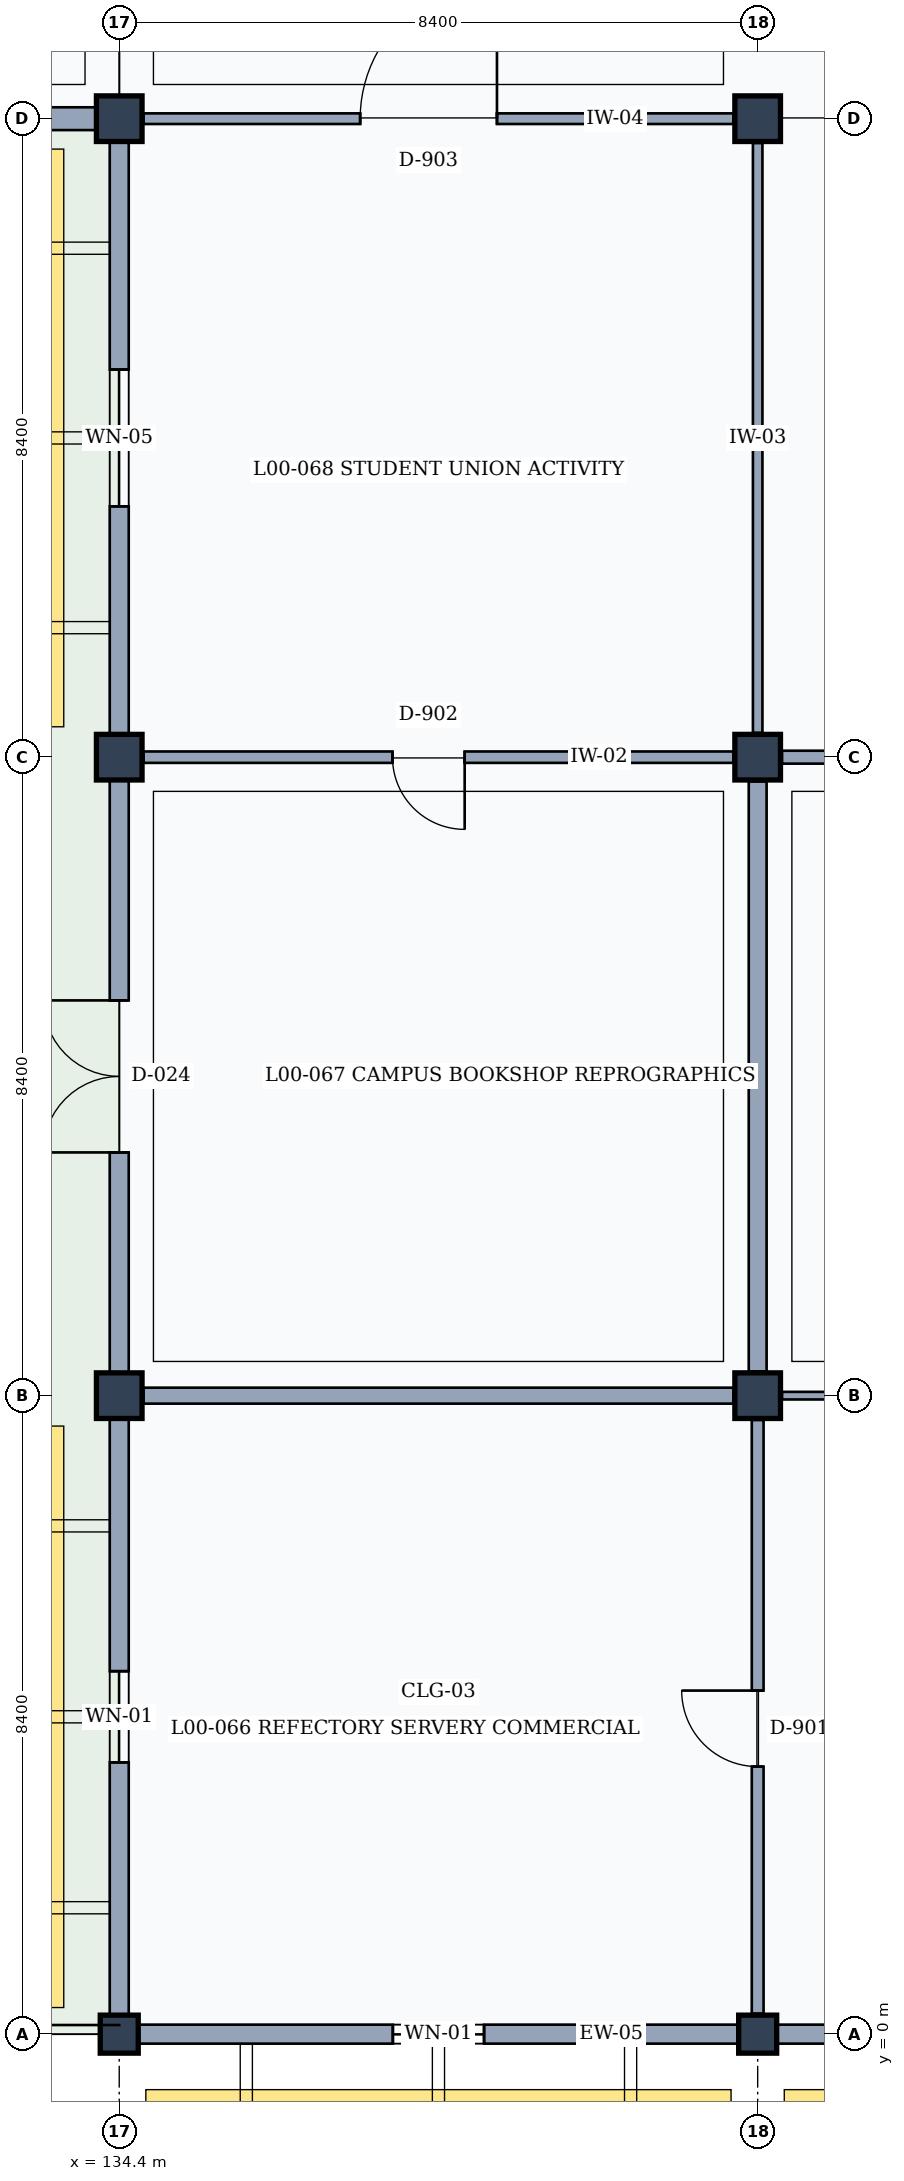
"""IFC4 building model, lengths in metres.
Left out: names, types, materials, properties, quantities, classifications, styles, units other than length and angle.
Written with IfcOpenShell. Run it as: python <this file> out.ifc"""

import sys

from ifc_helpers import new_model, si_unit, direction, frame, frame_2d, origin, origin_2d, place, context, subcontext, project, spatial, rectangle, extrude, element, fill, save


model = new_model("IFC4")
c1 = context("Model", 3, precision=1e-05, world=origin(), true_north=direction((0.0, 1.0)))
c2 = subcontext(c1, "Body", "Model", "MODEL_VIEW")
j1 = project(units=[si_unit("LENGTHUNIT", "METRE"), si_unit("PLANEANGLEUNIT", "RADIAN")], contexts=[c1])
p1 = place(None, origin())
s1 = spatial("IfcSite", under=j1, at=p1, CompositionType="ELEMENT")
p2 = place(p1, origin())
s2 = spatial("IfcBuilding", under=s1, at=p2, CompositionType="ELEMENT")
p3 = place(p2, origin())
s3 = spatial("IfcBuildingStorey", under=s2, at=p3, CompositionType="ELEMENT", Elevation=0.0)
p4 = place(p3, frame((134.4, 0.0, 0.0), z_axis=(0.0, 0.0, 1.0), x_axis=(1.0, 0.0, 0.0)))
e1 = element("IfcColumn", 1, at=p4, inside=s3, PredefinedType="COLUMN", context=c2, shape_type="SweptSolid", body=[
    extrude(rectangle(XDim=0.5, YDim=0.5, at=origin_2d()), origin(), (0.0, 0.0, 1.0), 4.8),
])
for number, where, z_axis, x_axis in (
    (2, (134.4, 8.4, 0.0), (0.0, 0.0, 1.0), (1.0, 0.0, 0.0)),
    (3, (134.4, 16.8, 0.0), (0.0, 0.0, 1.0), (1.0, 0.0, 0.0)),
    (4, (134.4, 25.2, 0.0), (0.0, 0.0, 1.0), (1.0, 0.0, 0.0)),
):
    element("IfcColumn", number, at=place(p3, frame(where, z_axis=z_axis, x_axis=x_axis)), inside=s3, PredefinedType="COLUMN", context=c2, shape_type="SweptSolid", body=[
        extrude(rectangle(XDim=0.6, YDim=0.6, at=origin_2d()), origin(), (0.0, 0.0, 1.0), 4.8),
    ])
p5 = place(p3, frame((142.8, 0.0, 0.0), z_axis=(0.0, 0.0, 1.0), x_axis=(1.0, 0.0, 0.0)))
e5 = element("IfcColumn", 5, at=p5, inside=s3, PredefinedType="COLUMN", context=c2, shape_type="SweptSolid", body=[
    extrude(rectangle(XDim=0.5, YDim=0.5, at=origin_2d()), origin(), (0.0, 0.0, 1.0), 4.8),
])
for number, where, z_axis, x_axis in (
    (6, (142.8, 8.4, 0.0), (0.0, 0.0, 1.0), (1.0, 0.0, 0.0)),
    (7, (142.8, 16.8, 0.0), (0.0, 0.0, 1.0), (1.0, 0.0, 0.0)),
    (8, (142.8, 25.2, 0.0), (0.0, 0.0, 1.0), (1.0, 0.0, 0.0)),
):
    element("IfcColumn", number, at=place(p3, frame(where, z_axis=z_axis, x_axis=x_axis)), inside=s3, PredefinedType="COLUMN", context=c2, shape_type="SweptSolid", body=[
        extrude(rectangle(XDim=0.6, YDim=0.6, at=origin_2d()), origin(), (0.0, 0.0, 1.0), 4.8),
    ])
p6 = place(p3, frame((134.1, 25.2, 0.0), z_axis=(0.0, 0.0, 1.0), x_axis=(-1.0, 0.0, 0.0)))
e9 = element("IfcWall", 9, at=p6, inside=s3, PredefinedType="SOLIDWALL", context=c2, shape_type="SweptSolid", body=[
    extrude(rectangle(XDim=7.8, YDim=0.3, at=frame_2d((3.9, 0.0))), origin(), (0.0, 0.0, 1.0), 3.87),
])
p7 = place(p6, frame((3.0, 0.0, 0.0)))
e10 = element("IfcOpeningElement", 10, at=p7, cuts=e9, PredefinedType="OPENING", context=c2, shape_type="SweptSolid", body=[
    extrude(rectangle(XDim=1.8, YDim=2.2, at=frame_2d((0.9, 1.1))), frame((0.0, 0.16, 0.0), z_axis=(0.0, -1.0, 0.0), x_axis=(1.0, 0.0, 0.0)), (0.0, 0.0, 1.0), 0.32),
])
p8 = place(p3, frame((142.55, 0.0, 0.0), z_axis=(0.0, 0.0, 1.0), x_axis=(-1.0, 0.0, 0.0)))
e11 = element("IfcWall", 11, at=p8, inside=s3, PredefinedType="SOLIDWALL", context=c2, shape_type="SweptSolid", body=[
    extrude(rectangle(XDim=7.9, YDim=0.25, at=frame_2d((3.95, 0.0))), origin(), (0.0, 0.0, 1.0), 3.96),
])
p9 = place(p8, frame((3.35, 0.0, 0.95)))
e12 = element("IfcOpeningElement", 12, at=p9, cuts=e11, PredefinedType="OPENING", context=c2, shape_type="SweptSolid", body=[
    extrude(rectangle(XDim=1.2, YDim=1.8, at=frame_2d((0.6, 0.9))), frame((0.0, 0.135, 0.0), z_axis=(0.0, -1.0, 0.0), x_axis=(1.0, 0.0, 0.0)), (0.0, 0.0, 1.0), 0.27),
])
p10 = place(p3, frame((134.4, 0.25, 0.0), z_axis=(0.0, 0.0, 1.0), x_axis=(0.0, 1.0, 0.0)))
e13 = element("IfcWall", 13, at=p10, inside=s3, PredefinedType="SOLIDWALL", context=c2, shape_type="SweptSolid", body=[
    extrude(rectangle(XDim=7.85, YDim=0.25, at=frame_2d((3.925, 0.0))), origin(), (0.0, 0.0, 1.0), 3.96),
])
p11 = place(p10, frame((3.325, 0.0, 0.95)))
e14 = element("IfcOpeningElement", 14, at=p11, cuts=e13, PredefinedType="OPENING", context=c2, shape_type="SweptSolid", body=[
    extrude(rectangle(XDim=1.2, YDim=1.8, at=frame_2d((0.6, 0.9))), frame((0.0, 0.135, 0.0), z_axis=(0.0, -1.0, 0.0), x_axis=(1.0, 0.0, 0.0)), (0.0, 0.0, 1.0), 0.27),
])
p12 = place(p3, frame((134.4, 8.7, 0.0), z_axis=(0.0, 0.0, 1.0), x_axis=(0.0, 1.0, 0.0)))
e15 = element("IfcWall", 15, at=p12, inside=s3, PredefinedType="SOLIDWALL", context=c2, shape_type="SweptSolid", body=[
    extrude(rectangle(XDim=7.8, YDim=0.25, at=frame_2d((3.9, 0.0))), origin(), (0.0, 0.0, 1.0), 3.96),
])
p13 = place(p12, frame((2.9, 0.0, 0.0)))
e16 = element("IfcOpeningElement", 16, at=p13, cuts=e15, PredefinedType="OPENING", context=c2, shape_type="SweptSolid", body=[
    extrude(rectangle(XDim=2.0, YDim=2.3, at=frame_2d((1.0, 1.15))), frame((0.0, 0.135, 0.0), z_axis=(0.0, -1.0, 0.0), x_axis=(1.0, 0.0, 0.0)), (0.0, 0.0, 1.0), 0.27),
])
p14 = place(p3, frame((134.4, 17.1, 0.0), z_axis=(0.0, 0.0, 1.0), x_axis=(0.0, 1.0, 0.0)))
e17 = element("IfcWall", 17, at=p14, inside=s3, PredefinedType="SOLIDWALL", context=c2, shape_type="SweptSolid", body=[
    extrude(rectangle(XDim=7.8, YDim=0.25, at=frame_2d((3.9, 0.0))), origin(), (0.0, 0.0, 1.0), 3.96),
])
p15 = place(p14, frame((3.0, 0.0, 0.95)))
e18 = element("IfcOpeningElement", 18, at=p15, cuts=e17, PredefinedType="OPENING", context=c2, shape_type="SweptSolid", body=[
    extrude(rectangle(XDim=1.8, YDim=1.5, at=frame_2d((0.9, 0.75))), frame((0.0, 0.135, 0.0), z_axis=(0.0, -1.0, 0.0), x_axis=(1.0, 0.0, 0.0)), (0.0, 0.0, 1.0), 0.27),
])
p16 = place(p3, frame((150.9, 0.0, 0.0), z_axis=(0.0, 0.0, 1.0), x_axis=(-1.0, 0.0, 0.0)))
e19 = element("IfcWall", 19, at=p16, inside=s3, PredefinedType="SOLIDWALL", context=c2, shape_type="SweptSolid", body=[
    extrude(rectangle(XDim=7.85, YDim=0.25, at=frame_2d((3.925, 0.0))), origin(), (0.0, 0.0, 1.0), 3.96),
])
p17 = place(p16, frame((3.125, 0.0, 0.95)))
e20 = element("IfcOpeningElement", 20, at=p17, cuts=e19, PredefinedType="OPENING", context=c2, shape_type="SweptSolid", body=[
    extrude(rectangle(XDim=1.6, YDim=2.0, at=frame_2d((0.8, 1.0))), frame((0.0, 0.135, 0.0), z_axis=(0.0, -1.0, 0.0), x_axis=(1.0, 0.0, 0.0)), (0.0, 0.0, 1.0), 0.27),
])
p18 = place(p3, frame((142.8, 0.27, 0.0), z_axis=(0.0, 0.0, 1.0), x_axis=(0.0, 1.0, 0.0)))
e21 = element("IfcWall", 21, at=p18, inside=s3, PredefinedType="PARTITIONING", context=c2, shape_type="SweptSolid", body=[
    extrude(rectangle(XDim=7.81, YDim=0.155, at=frame_2d((3.905, 0.0))), origin(), (0.0, 0.0, 1.0), 3.92),
])
p19 = place(p18, frame((3.25, 0.0, 0.0)))
e22 = element("IfcOpeningElement", 22, at=p19, cuts=e21, PredefinedType="OPENING", context=c2, shape_type="SweptSolid", body=[
    extrude(rectangle(XDim=1.0, YDim=2.15, at=frame_2d((0.5, 1.075))), frame((0.0, 0.087, 0.0), z_axis=(0.0, -1.0, 0.0), x_axis=(1.0, 0.0, 0.0)), (0.0, 0.0, 1.0), 0.175),
])
p20 = place(p3, frame((134.72, 8.4, 0.0), z_axis=(0.0, 0.0, 1.0), x_axis=(1.0, 0.0, 0.0)))
e23 = element("IfcWall", 23, at=p20, inside=s3, PredefinedType="PARTITIONING", context=c2, shape_type="SweptSolid", body=[
    extrude(rectangle(XDim=7.76, YDim=0.21, at=frame_2d((3.88, 0.0))), origin(), (0.0, 0.0, 1.0), 3.87),
])
p21 = place(p3, frame((142.8, 8.72, 0.0), z_axis=(0.0, 0.0, 1.0), x_axis=(0.0, 1.0, 0.0)))
e24 = element("IfcWall", 24, at=p21, inside=s3, PredefinedType="PARTITIONING", context=c2, shape_type="SweptSolid", body=[
    extrude(rectangle(XDim=7.76, YDim=0.235, at=frame_2d((3.88, 0.0))), origin(), (0.0, 0.0, 1.0), 3.92),
])
p22 = place(p3, frame((134.72, 16.8, 0.0), z_axis=(0.0, 0.0, 1.0), x_axis=(1.0, 0.0, 0.0)))
e25 = element("IfcWall", 25, at=p22, inside=s3, PredefinedType="PARTITIONING", context=c2, shape_type="SweptSolid", body=[
    extrude(rectangle(XDim=7.76, YDim=0.15, at=frame_2d((3.88, 0.0))), origin(), (0.0, 0.0, 1.0), 3.87),
])
p23 = place(p22, frame((3.275, 0.0, 0.0)))
e26 = element("IfcOpeningElement", 26, at=p23, cuts=e25, PredefinedType="OPENING", context=c2, shape_type="SweptSolid", body=[
    extrude(rectangle(XDim=0.95, YDim=2.15, at=frame_2d((0.475, 1.075))), frame((0.0, 0.085, 0.0), z_axis=(0.0, -1.0, 0.0), x_axis=(1.0, 0.0, 0.0)), (0.0, 0.0, 1.0), 0.17),
])
p24 = place(p3, frame((142.8, 17.12, 0.0), z_axis=(0.0, 0.0, 1.0), x_axis=(0.0, 1.0, 0.0)))
e27 = element("IfcWall", 27, at=p24, inside=s3, PredefinedType="PARTITIONING", context=c2, shape_type="SweptSolid", body=[
    extrude(rectangle(XDim=7.76, YDim=0.125, at=frame_2d((3.88, 0.0))), origin(), (0.0, 0.0, 1.0), 3.92),
])
p25 = place(p3, frame((134.72, 25.2, 0.0), z_axis=(0.0, 0.0, 1.0), x_axis=(1.0, 0.0, 0.0)))
e28 = element("IfcWall", 28, at=p25, inside=s3, PredefinedType="PARTITIONING", context=c2, shape_type="SweptSolid", body=[
    extrude(rectangle(XDim=7.76, YDim=0.14, at=frame_2d((3.88, 0.0))), origin(), (0.0, 0.0, 1.0), 3.87),
])
p26 = place(p25, frame((2.85, 0.0, 0.0)))
e29 = element("IfcOpeningElement", 29, at=p26, cuts=e28, PredefinedType="OPENING", context=c2, shape_type="SweptSolid", body=[
    extrude(rectangle(XDim=1.8, YDim=2.3, at=frame_2d((0.9, 1.15))), frame((0.0, 0.08, 0.0), z_axis=(0.0, -1.0, 0.0), x_axis=(1.0, 0.0, 0.0)), (0.0, 0.0, 1.0), 0.16),
])
p27 = place(p3, frame((143.12, 8.4, 0.0), z_axis=(0.0, 0.0, 1.0), x_axis=(1.0, 0.0, 0.0)))
e30 = element("IfcWall", 30, at=p27, inside=s3, PredefinedType="MOVABLE", context=c2, shape_type="SweptSolid", body=[
    extrude(rectangle(XDim=7.76, YDim=0.1, at=frame_2d((3.88, 0.0))), origin(), (0.0, 0.0, 1.0), 3.87),
])
p28 = place(p3, frame((143.12, 16.8, 0.0), z_axis=(0.0, 0.0, 1.0), x_axis=(1.0, 0.0, 0.0)))
e31 = element("IfcWall", 31, at=p28, inside=s3, PredefinedType="PARTITIONING", context=c2, shape_type="SweptSolid", body=[
    extrude(rectangle(XDim=7.76, YDim=0.17, at=frame_2d((3.88, 0.0))), origin(), (0.0, 0.0, 1.0), 3.87),
])
p29 = place(p28, frame((3.125, 0.0, 0.0)))
e32 = element("IfcOpeningElement", 32, at=p29, cuts=e31, PredefinedType="OPENING", context=c2, shape_type="SweptSolid", body=[
    extrude(rectangle(XDim=1.25, YDim=2.3, at=frame_2d((0.625, 1.15))), frame((0.0, 0.095, 0.0), z_axis=(0.0, -1.0, 0.0), x_axis=(1.0, 0.0, 0.0)), (0.0, 0.0, 1.0), 0.19),
])
p30 = place(p9, origin())
e33 = element("IfcWindow", 33, at=p30, inside=s3, PartitioningType="SINGLE_PANEL", PredefinedType="WINDOW", context=c2, shape_type="SweptSolid", body=[
    extrude(rectangle(XDim=1.2, YDim=1.8, at=frame_2d((0.6, 0.9))), frame((0.0, 0.03, 0.0), z_axis=(0.0, -1.0, 0.0), x_axis=(1.0, 0.0, 0.0)), (0.0, 0.0, 1.0), 0.06),
])
fill(e12, e33)
p31 = place(p11, origin())
e34 = element("IfcWindow", 34, at=p31, inside=s3, PartitioningType="SINGLE_PANEL", PredefinedType="WINDOW", context=c2, shape_type="SweptSolid", body=[
    extrude(rectangle(XDim=1.2, YDim=1.8, at=frame_2d((0.6, 0.9))), frame((0.0, 0.03, 0.0), z_axis=(0.0, -1.0, 0.0), x_axis=(1.0, 0.0, 0.0)), (0.0, 0.0, 1.0), 0.06),
])
fill(e14, e34)
p32 = place(p13, origin())
e35 = element("IfcDoor", 35, at=p32, inside=s3, OperationType="DOUBLE_DOOR_SINGLE_SWING", PredefinedType="DOOR", context=c2, shape_type="SweptSolid", body=[
    extrude(rectangle(XDim=2.0, YDim=2.3, at=frame_2d((1.0, 1.15))), frame((0.0, 0.025, 0.0), z_axis=(0.0, -1.0, 0.0), x_axis=(1.0, 0.0, 0.0)), (0.0, 0.0, 1.0), 0.05),
])
fill(e16, e35)
p33 = place(p15, origin())
e36 = element("IfcWindow", 36, at=p33, inside=s3, PartitioningType="SINGLE_PANEL", PredefinedType="WINDOW", context=c2, shape_type="SweptSolid", body=[
    extrude(rectangle(XDim=1.8, YDim=1.5, at=frame_2d((0.9, 0.75))), frame((0.0, 0.03, 0.0), z_axis=(0.0, -1.0, 0.0), x_axis=(1.0, 0.0, 0.0)), (0.0, 0.0, 1.0), 0.06),
])
fill(e18, e36)
p34 = place(p19, origin())
e37 = element("IfcDoor", 37, at=p34, inside=s3, OperationType="SINGLE_SWING_RIGHT", PredefinedType="DOOR", context=c2, shape_type="SweptSolid", body=[
    extrude(rectangle(XDim=1.0, YDim=2.15, at=frame_2d((0.5, 1.075))), frame((0.0, 0.025, 0.0), z_axis=(0.0, -1.0, 0.0), x_axis=(1.0, 0.0, 0.0)), (0.0, 0.0, 1.0), 0.05),
])
fill(e22, e37)
p35 = place(p23, frame((0.95, 0.0, 0.0), z_axis=(0.0, 0.0, 1.0), x_axis=(-1.0, 0.0, 0.0)))
e38 = element("IfcDoor", 38, at=p35, inside=s3, OperationType="SINGLE_SWING_LEFT", PredefinedType="DOOR", context=c2, shape_type="SweptSolid", body=[
    extrude(rectangle(XDim=0.95, YDim=2.15, at=frame_2d((0.475, 1.075))), frame((0.0, 0.025, 0.0), z_axis=(0.0, -1.0, 0.0), x_axis=(1.0, 0.0, 0.0)), (0.0, 0.0, 1.0), 0.05),
])
fill(e26, e38)
p36 = place(p26, origin())
e39 = element("IfcDoor", 39, at=p36, inside=s3, OperationType="SINGLE_SWING_RIGHT", PredefinedType="DOOR", context=c2, shape_type="SweptSolid", body=[
    extrude(rectangle(XDim=1.8, YDim=2.3, at=frame_2d((0.9, 1.15))), frame((0.0, 0.025, 0.0), z_axis=(0.0, -1.0, 0.0), x_axis=(1.0, 0.0, 0.0)), (0.0, 0.0, 1.0), 0.05),
])
fill(e29, e39)
save(model, sys.argv[1])
